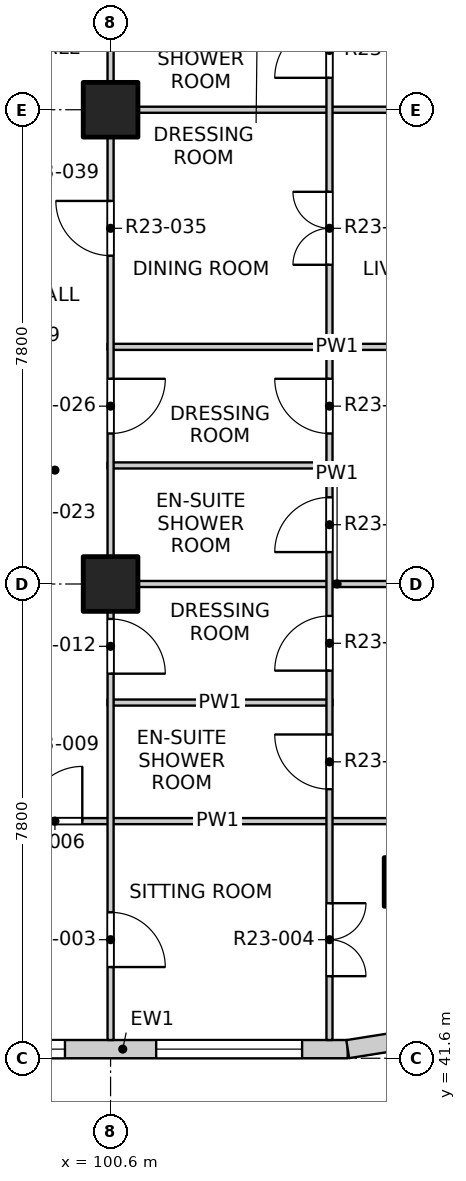
"""IFC4 building model, lengths in metres.
Left out: names, types, materials, properties, quantities, classifications, styles, units other than length and angle.
Written with IfcOpenShell. Run it as: python <this file> out.ifc"""

import sys

from ifc_helpers import new_model, si_unit, direction, frame, frame_2d, origin, origin_2d, place, context, subcontext, project, spatial, rectangle, extrude, element, fill, save


model = new_model("IFC4")
c1 = context("Model", 3, precision=1e-05, world=origin(), true_north=direction((0.0, 1.0)))
c2 = subcontext(c1, "Body", "Model", "MODEL_VIEW")
j1 = project(units=[si_unit("LENGTHUNIT", "METRE"), si_unit("PLANEANGLEUNIT", "RADIAN")], contexts=[c1])
p1 = place(None, origin())
s1 = spatial("IfcSite", under=j1, at=p1, CompositionType="ELEMENT")
p2 = place(p1, origin())
s2 = spatial("IfcBuilding", under=s1, at=p2, CompositionType="ELEMENT")
p3 = place(p2, frame((0.0, 0.0, 234.7)))
s3 = spatial("IfcBuildingStorey", under=s2, at=p3, CompositionType="ELEMENT", Elevation=234.7)
p4 = place(p3, frame((105.5, 44.5, -0.25), z_axis=(0.0, 0.0, 1.0), x_axis=(1.0, 0.0, 0.0)))
e1 = element("IfcColumn", 1, at=p4, inside=s3, PredefinedType="COLUMN", context=c2, shape_type="SweptSolid", body=[
    extrude(rectangle(XDim=0.8, YDim=0.8, at=origin_2d()), origin(), (0.0, 0.0, 1.0), 3.4),
])
for number, where, z_axis, x_axis in (
    (2, (100.6, 49.4, -0.25), (0.0, 0.0, 1.0), (1.0, 0.0, 0.0)),
    (3, (100.6, 57.2, -0.25), (0.0, 0.0, 1.0), (1.0, 0.0, 0.0)),
):
    element("IfcColumn", number, at=place(p3, frame(where, z_axis=z_axis, x_axis=x_axis)), inside=s3, PredefinedType="COLUMN", context=c2, shape_type="SweptSolid", body=[
        extrude(rectangle(XDim=0.9, YDim=0.9, at=origin_2d()), origin(), (0.0, 0.0, 1.0), 3.4),
    ])
p5 = place(p3, frame((97.1, 41.75, 0.0), z_axis=(0.0, 0.0, 1.0), x_axis=(1.0, 0.0, 0.0)))
e4 = element("IfcWall", 4, at=p5, inside=s3, PredefinedType="SOLIDWALL", context=c2, shape_type="SweptSolid", body=[
    extrude(rectangle(XDim=7.4, YDim=0.3, at=frame_2d((3.7, 0.0))), origin(), (0.0, 0.0, 1.0), 2.7),
])
p6 = place(p5, frame((0.35, 0.0, 0.9)))
e5 = element("IfcOpeningElement", 5, at=p6, cuts=e4, PredefinedType="OPENING", context=c2, shape_type="SweptSolid", body=[
    extrude(rectangle(XDim=2.4, YDim=1.8, at=frame_2d((1.2, 0.9))), frame((0.0, 0.16, 0.0), z_axis=(0.0, -1.0, 0.0), x_axis=(1.0, 0.0, 0.0)), (0.0, 0.0, 1.0), 0.32),
])
p7 = place(p5, frame((4.25, 0.0, 0.9)))
e6 = element("IfcOpeningElement", 6, at=p7, cuts=e4, PredefinedType="OPENING", context=c2, shape_type="SweptSolid", body=[
    extrude(rectangle(XDim=2.4, YDim=1.8, at=frame_2d((1.2, 0.9))), frame((0.0, 0.16, 0.0), z_axis=(0.0, -1.0, 0.0), x_axis=(1.0, 0.0, 0.0)), (0.0, 0.0, 1.0), 0.32),
])
p8 = place(p3, frame((104.5, 41.75, 0.0), z_axis=(0.0, 0.0, 1.0), x_axis=(0.987678452879, 0.156496880861, 0.0)))
e7 = element("IfcWall", 7, at=p8, inside=s3, PredefinedType="SOLIDWALL", context=c2, shape_type="SweptSolid", body=[
    extrude(rectangle(XDim=1.173, YDim=0.3, at=frame_2d((0.586, 0.0))), origin(), (0.0, 0.0, 1.0), 2.7),
])
p9 = place(p3, frame((96.625, 45.5, 0.0), z_axis=(0.0, 0.0, 1.0), x_axis=(1.0, 0.0, 0.0)))
e8 = element("IfcWall", 8, at=p9, inside=s3, PredefinedType="PARTITIONING", context=c2, shape_type="SweptSolid", body=[
    extrude(rectangle(XDim=11.475, YDim=0.1, at=frame_2d((5.738, 0.0))), origin(), (0.0, 0.0, 1.0), 3.15),
])
p10 = place(p9, frame((2.61, 0.0, 0.0)))
e9 = element("IfcOpeningElement", 9, at=p10, cuts=e8, PredefinedType="OPENING", context=c2, shape_type="SweptSolid", body=[
    extrude(rectangle(XDim=0.9, YDim=2.1, at=frame_2d((0.45, 1.05))), frame((0.0, 0.06, 0.0), z_axis=(0.0, -1.0, 0.0), x_axis=(1.0, 0.0, 0.0)), (0.0, 0.0, 1.0), 0.12),
])
p11 = place(p3, frame((100.55, 47.45, 0.0), z_axis=(0.0, 0.0, 1.0), x_axis=(1.0, 0.0, 0.0)))
e10 = element("IfcWall", 10, at=p11, inside=s3, PredefinedType="PARTITIONING", context=c2, shape_type="SweptSolid", body=[
    extrude(rectangle(XDim=3.7, YDim=0.1, at=frame_2d((1.85, 0.0))), origin(), (0.0, 0.0, 1.0), 3.15),
])
p12 = place(p3, frame((100.55, 49.4, 0.0), z_axis=(0.0, 0.0, 1.0), x_axis=(1.0, 0.0, 0.0)))
e11 = element("IfcWall", 11, at=p12, inside=s3, PredefinedType="PARTITIONING", context=c2, shape_type="SweptSolid", body=[
    extrude(rectangle(XDim=7.55, YDim=0.1, at=frame_2d((3.775, 0.0))), origin(), (0.0, 0.0, 1.0), 3.15),
])
p13 = place(p3, frame((100.55, 51.35, 0.0), z_axis=(0.0, 0.0, 1.0), x_axis=(1.0, 0.0, 0.0)))
e12 = element("IfcWall", 12, at=p13, inside=s3, PredefinedType="PARTITIONING", context=c2, shape_type="SweptSolid", body=[
    extrude(rectangle(XDim=3.7, YDim=0.1, at=frame_2d((1.85, 0.0))), origin(), (0.0, 0.0, 1.0), 3.15),
])
for number, where, z_axis, x_axis in (
    (13, (100.55, 53.3, 0.0), (0.0, 0.0, 1.0), (1.0, 0.0, 0.0)),
    (14, (100.55, 57.2, 0.0), (0.0, 0.0, 1.0), (1.0, 0.0, 0.0)),
):
    element("IfcWall", number, at=place(p3, frame(where, z_axis=z_axis, x_axis=x_axis)), inside=s3, PredefinedType="PARTITIONING", context=c2, shape_type="SweptSolid", body=[
        extrude(rectangle(XDim=7.55, YDim=0.1, at=frame_2d((3.775, 0.0))), origin(), (0.0, 0.0, 1.0), 3.15),
    ])
p14 = place(p3, frame((100.6, 41.9, 0.0), z_axis=(0.0, 0.0, 1.0), x_axis=(0.0, 1.0, 0.0)))
e15 = element("IfcWall", 15, at=p14, inside=s3, PredefinedType="PARTITIONING", context=c2, shape_type="SweptSolid", body=[
    extrude(rectangle(XDim=46.2, YDim=0.1, at=frame_2d((23.1, 0.0))), origin(), (0.0, 0.0, 1.0), 3.15),
])
p15 = place(p14, frame((1.2, 0.0, 0.0)))
e16 = element("IfcOpeningElement", 16, at=p15, cuts=e15, PredefinedType="OPENING", context=c2, shape_type="SweptSolid", body=[
    extrude(rectangle(XDim=0.9, YDim=2.1, at=frame_2d((0.45, 1.05))), frame((0.0, 0.06, 0.0), z_axis=(0.0, -1.0, 0.0), x_axis=(1.0, 0.0, 0.0)), (0.0, 0.0, 1.0), 0.12),
])
p16 = place(p14, frame((6.025, 0.0, 0.0)))
e17 = element("IfcOpeningElement", 17, at=p16, cuts=e15, PredefinedType="OPENING", context=c2, shape_type="SweptSolid", body=[
    extrude(rectangle(XDim=0.9, YDim=2.1, at=frame_2d((0.45, 1.05))), frame((0.0, 0.06, 0.0), z_axis=(0.0, -1.0, 0.0), x_axis=(1.0, 0.0, 0.0)), (0.0, 0.0, 1.0), 0.12),
])
p17 = place(p14, frame((9.975, 0.0, 0.0)))
e18 = element("IfcOpeningElement", 18, at=p17, cuts=e15, PredefinedType="OPENING", context=c2, shape_type="SweptSolid", body=[
    extrude(rectangle(XDim=0.9, YDim=2.1, at=frame_2d((0.45, 1.05))), frame((0.0, 0.06, 0.0), z_axis=(0.0, -1.0, 0.0), x_axis=(1.0, 0.0, 0.0)), (0.0, 0.0, 1.0), 0.12),
])
p18 = place(p14, frame((12.9, 0.0, 0.0)))
e19 = element("IfcOpeningElement", 19, at=p18, cuts=e15, PredefinedType="OPENING", context=c2, shape_type="SweptSolid", body=[
    extrude(rectangle(XDim=0.9, YDim=2.1, at=frame_2d((0.45, 1.05))), frame((0.0, 0.06, 0.0), z_axis=(0.0, -1.0, 0.0), x_axis=(1.0, 0.0, 0.0)), (0.0, 0.0, 1.0), 0.12),
])
p19 = place(p14, frame((17.775, 0.0, 0.0)))
e20 = element("IfcOpeningElement", 20, at=p19, cuts=e15, PredefinedType="OPENING", context=c2, shape_type="SweptSolid", body=[
    extrude(rectangle(XDim=0.9, YDim=2.1, at=frame_2d((0.45, 1.05))), frame((0.0, 0.06, 0.0), z_axis=(0.0, -1.0, 0.0), x_axis=(1.0, 0.0, 0.0)), (0.0, 0.0, 1.0), 0.12),
])
p20 = place(p14, frame((21.625, 0.0, 0.0)))
e21 = element("IfcOpeningElement", 21, at=p20, cuts=e15, PredefinedType="OPENING", context=c2, shape_type="SweptSolid", body=[
    extrude(rectangle(XDim=0.9, YDim=2.1, at=frame_2d((0.45, 1.05))), frame((0.0, 0.06, 0.0), z_axis=(0.0, -1.0, 0.0), x_axis=(1.0, 0.0, 0.0)), (0.0, 0.0, 1.0), 0.12),
])
p21 = place(p14, frame((25.575, 0.0, 0.0)))
e22 = element("IfcOpeningElement", 22, at=p21, cuts=e15, PredefinedType="OPENING", context=c2, shape_type="SweptSolid", body=[
    extrude(rectangle(XDim=0.9, YDim=2.1, at=frame_2d((0.45, 1.05))), frame((0.0, 0.06, 0.0), z_axis=(0.0, -1.0, 0.0), x_axis=(1.0, 0.0, 0.0)), (0.0, 0.0, 1.0), 0.12),
])
p22 = place(p14, frame((28.5, 0.0, 0.0)))
e23 = element("IfcOpeningElement", 23, at=p22, cuts=e15, PredefinedType="OPENING", context=c2, shape_type="SweptSolid", body=[
    extrude(rectangle(XDim=0.9, YDim=2.1, at=frame_2d((0.45, 1.05))), frame((0.0, 0.06, 0.0), z_axis=(0.0, -1.0, 0.0), x_axis=(1.0, 0.0, 0.0)), (0.0, 0.0, 1.0), 0.12),
])
p23 = place(p14, frame((33.375, 0.0, 0.0)))
e24 = element("IfcOpeningElement", 24, at=p23, cuts=e15, PredefinedType="OPENING", context=c2, shape_type="SweptSolid", body=[
    extrude(rectangle(XDim=0.9, YDim=2.1, at=frame_2d((0.45, 1.05))), frame((0.0, 0.06, 0.0), z_axis=(0.0, -1.0, 0.0), x_axis=(1.0, 0.0, 0.0)), (0.0, 0.0, 1.0), 0.12),
])
p24 = place(p14, frame((36.3, 0.0, 0.0)))
e25 = element("IfcOpeningElement", 25, at=p24, cuts=e15, PredefinedType="OPENING", context=c2, shape_type="SweptSolid", body=[
    extrude(rectangle(XDim=0.9, YDim=2.1, at=frame_2d((0.45, 1.05))), frame((0.0, 0.06, 0.0), z_axis=(0.0, -1.0, 0.0), x_axis=(1.0, 0.0, 0.0)), (0.0, 0.0, 1.0), 0.12),
])
p25 = place(p14, frame((40.2, 0.0, 0.0)))
e26 = element("IfcOpeningElement", 26, at=p25, cuts=e15, PredefinedType="OPENING", context=c2, shape_type="SweptSolid", body=[
    extrude(rectangle(XDim=0.9, YDim=2.1, at=frame_2d((0.45, 1.05))), frame((0.0, 0.06, 0.0), z_axis=(0.0, -1.0, 0.0), x_axis=(1.0, 0.0, 0.0)), (0.0, 0.0, 1.0), 0.12),
])
p26 = place(p14, frame((44.1, 0.0, 0.0)))
e27 = element("IfcOpeningElement", 27, at=p26, cuts=e15, PredefinedType="OPENING", context=c2, shape_type="SweptSolid", body=[
    extrude(rectangle(XDim=0.9, YDim=2.1, at=frame_2d((0.45, 1.05))), frame((0.0, 0.06, 0.0), z_axis=(0.0, -1.0, 0.0), x_axis=(1.0, 0.0, 0.0)), (0.0, 0.0, 1.0), 0.12),
])
p27 = place(p3, frame((104.2, 41.9, 0.0), z_axis=(0.0, 0.0, 1.0), x_axis=(0.0, 1.0, 0.0)))
e28 = element("IfcWall", 28, at=p27, inside=s3, PredefinedType="PARTITIONING", context=c2, shape_type="SweptSolid", body=[
    extrude(rectangle(XDim=19.1, YDim=0.1, at=frame_2d((9.55, 0.0))), origin(), (0.0, 0.0, 1.0), 3.15),
])
p28 = place(p27, frame((1.05, 0.0, 0.0)))
e29 = element("IfcOpeningElement", 29, at=p28, cuts=e28, PredefinedType="OPENING", context=c2, shape_type="SweptSolid", body=[
    extrude(rectangle(XDim=1.2, YDim=2.1, at=frame_2d((0.6, 1.05))), frame((0.0, 0.06, 0.0), z_axis=(0.0, -1.0, 0.0), x_axis=(1.0, 0.0, 0.0)), (0.0, 0.0, 1.0), 0.12),
])
p29 = place(p27, frame((4.125, 0.0, 0.0)))
e30 = element("IfcOpeningElement", 30, at=p29, cuts=e28, PredefinedType="OPENING", context=c2, shape_type="SweptSolid", body=[
    extrude(rectangle(XDim=0.9, YDim=2.1, at=frame_2d((0.45, 1.05))), frame((0.0, 0.06, 0.0), z_axis=(0.0, -1.0, 0.0), x_axis=(1.0, 0.0, 0.0)), (0.0, 0.0, 1.0), 0.12),
])
p30 = place(p27, frame((6.075, 0.0, 0.0)))
e31 = element("IfcOpeningElement", 31, at=p30, cuts=e28, PredefinedType="OPENING", context=c2, shape_type="SweptSolid", body=[
    extrude(rectangle(XDim=0.9, YDim=2.1, at=frame_2d((0.45, 1.05))), frame((0.0, 0.06, 0.0), z_axis=(0.0, -1.0, 0.0), x_axis=(1.0, 0.0, 0.0)), (0.0, 0.0, 1.0), 0.12),
])
p31 = place(p27, frame((8.025, 0.0, 0.0)))
e32 = element("IfcOpeningElement", 32, at=p31, cuts=e28, PredefinedType="OPENING", context=c2, shape_type="SweptSolid", body=[
    extrude(rectangle(XDim=0.9, YDim=2.1, at=frame_2d((0.45, 1.05))), frame((0.0, 0.06, 0.0), z_axis=(0.0, -1.0, 0.0), x_axis=(1.0, 0.0, 0.0)), (0.0, 0.0, 1.0), 0.12),
])
p32 = place(p27, frame((9.975, 0.0, 0.0)))
e33 = element("IfcOpeningElement", 33, at=p32, cuts=e28, PredefinedType="OPENING", context=c2, shape_type="SweptSolid", body=[
    extrude(rectangle(XDim=0.9, YDim=2.1, at=frame_2d((0.45, 1.05))), frame((0.0, 0.06, 0.0), z_axis=(0.0, -1.0, 0.0), x_axis=(1.0, 0.0, 0.0)), (0.0, 0.0, 1.0), 0.12),
])
p33 = place(p27, frame((12.75, 0.0, 0.0)))
e34 = element("IfcOpeningElement", 34, at=p33, cuts=e28, PredefinedType="OPENING", context=c2, shape_type="SweptSolid", body=[
    extrude(rectangle(XDim=1.2, YDim=2.1, at=frame_2d((0.6, 1.05))), frame((0.0, 0.06, 0.0), z_axis=(0.0, -1.0, 0.0), x_axis=(1.0, 0.0, 0.0)), (0.0, 0.0, 1.0), 0.12),
])
p34 = place(p27, frame((15.825, 0.0, 0.0)))
e35 = element("IfcOpeningElement", 35, at=p34, cuts=e28, PredefinedType="OPENING", context=c2, shape_type="SweptSolid", body=[
    extrude(rectangle(XDim=0.9, YDim=2.1, at=frame_2d((0.45, 1.05))), frame((0.0, 0.06, 0.0), z_axis=(0.0, -1.0, 0.0), x_axis=(1.0, 0.0, 0.0)), (0.0, 0.0, 1.0), 0.12),
])
p35 = place(p27, frame((17.775, 0.0, 0.0)))
e36 = element("IfcOpeningElement", 36, at=p35, cuts=e28, PredefinedType="OPENING", context=c2, shape_type="SweptSolid", body=[
    extrude(rectangle(XDim=0.9, YDim=2.1, at=frame_2d((0.45, 1.05))), frame((0.0, 0.06, 0.0), z_axis=(0.0, -1.0, 0.0), x_axis=(1.0, 0.0, 0.0)), (0.0, 0.0, 1.0), 0.12),
])
p36 = place(p6, origin())
e37 = element("IfcWindow", 37, at=p36, inside=s3, PartitioningType="DOUBLE_PANEL_VERTICAL", PredefinedType="WINDOW", context=c2, shape_type="SweptSolid", body=[
    extrude(rectangle(XDim=2.4, YDim=1.8, at=frame_2d((1.2, 0.9))), frame((0.0, 0.03, 0.0), z_axis=(0.0, -1.0, 0.0), x_axis=(1.0, 0.0, 0.0)), (0.0, 0.0, 1.0), 0.06),
])
fill(e5, e37)
p37 = place(p7, origin())
e38 = element("IfcWindow", 38, at=p37, inside=s3, PartitioningType="DOUBLE_PANEL_VERTICAL", PredefinedType="WINDOW", context=c2, shape_type="SweptSolid", body=[
    extrude(rectangle(XDim=2.4, YDim=1.8, at=frame_2d((1.2, 0.9))), frame((0.0, 0.03, 0.0), z_axis=(0.0, -1.0, 0.0), x_axis=(1.0, 0.0, 0.0)), (0.0, 0.0, 1.0), 0.06),
])
fill(e6, e38)
p38 = place(p15, origin())
e39 = element("IfcDoor", 39, at=p38, inside=s3, OperationType="SINGLE_SWING_RIGHT", PredefinedType="DOOR", context=c2, shape_type="SweptSolid", body=[
    extrude(rectangle(XDim=0.9, YDim=2.1, at=frame_2d((0.45, 1.05))), frame((0.0, 0.025, 0.0), z_axis=(0.0, -1.0, 0.0), x_axis=(1.0, 0.0, 0.0)), (0.0, 0.0, 1.0), 0.05),
])
fill(e16, e39)
p39 = place(p28, origin())
e40 = element("IfcDoor", 40, at=p39, inside=s3, OperationType="DOUBLE_DOOR_SINGLE_SWING", PredefinedType="DOOR", context=c2, shape_type="SweptSolid", body=[
    extrude(rectangle(XDim=1.2, YDim=2.1, at=frame_2d((0.6, 1.05))), frame((0.0, 0.025, 0.0), z_axis=(0.0, -1.0, 0.0), x_axis=(1.0, 0.0, 0.0)), (0.0, 0.0, 1.0), 0.05),
])
fill(e29, e40)
p40 = place(p10, origin())
e41 = element("IfcDoor", 41, at=p40, inside=s3, OperationType="SINGLE_SWING_RIGHT", PredefinedType="DOOR", context=c2, shape_type="SweptSolid", body=[
    extrude(rectangle(XDim=0.9, YDim=2.1, at=frame_2d((0.45, 1.05))), frame((0.0, 0.025, 0.0), z_axis=(0.0, -1.0, 0.0), x_axis=(1.0, 0.0, 0.0)), (0.0, 0.0, 1.0), 0.05),
])
fill(e9, e41)
p41 = place(p29, origin())
e42 = element("IfcDoor", 42, at=p41, inside=s3, OperationType="SINGLE_SWING_RIGHT", PredefinedType="DOOR", context=c2, shape_type="SweptSolid", body=[
    extrude(rectangle(XDim=0.9, YDim=2.1, at=frame_2d((0.45, 1.05))), frame((0.0, 0.025, 0.0), z_axis=(0.0, -1.0, 0.0), x_axis=(1.0, 0.0, 0.0)), (0.0, 0.0, 1.0), 0.05),
])
fill(e30, e42)
p42 = place(p16, origin())
e43 = element("IfcDoor", 43, at=p42, inside=s3, OperationType="SINGLE_SWING_RIGHT", PredefinedType="DOOR", context=c2, shape_type="SweptSolid", body=[
    extrude(rectangle(XDim=0.9, YDim=2.1, at=frame_2d((0.45, 1.05))), frame((0.0, 0.025, 0.0), z_axis=(0.0, -1.0, 0.0), x_axis=(1.0, 0.0, 0.0)), (0.0, 0.0, 1.0), 0.05),
])
fill(e17, e43)
p43 = place(p30, origin())
e44 = element("IfcDoor", 44, at=p43, inside=s3, OperationType="SINGLE_SWING_LEFT", PredefinedType="DOOR", context=c2, shape_type="SweptSolid", body=[
    extrude(rectangle(XDim=0.9, YDim=2.1, at=frame_2d((0.45, 1.05))), frame((0.0, 0.025, 0.0), z_axis=(0.0, -1.0, 0.0), x_axis=(1.0, 0.0, 0.0)), (0.0, 0.0, 1.0), 0.05),
])
fill(e31, e44)
p44 = place(p31, origin())
e45 = element("IfcDoor", 45, at=p44, inside=s3, OperationType="SINGLE_SWING_LEFT", PredefinedType="DOOR", context=c2, shape_type="SweptSolid", body=[
    extrude(rectangle(XDim=0.9, YDim=2.1, at=frame_2d((0.45, 1.05))), frame((0.0, 0.025, 0.0), z_axis=(0.0, -1.0, 0.0), x_axis=(1.0, 0.0, 0.0)), (0.0, 0.0, 1.0), 0.05),
])
fill(e32, e45)
p45 = place(p17, origin())
e46 = element("IfcDoor", 46, at=p45, inside=s3, OperationType="SINGLE_SWING_LEFT", PredefinedType="DOOR", context=c2, shape_type="SweptSolid", body=[
    extrude(rectangle(XDim=0.9, YDim=2.1, at=frame_2d((0.45, 1.05))), frame((0.0, 0.025, 0.0), z_axis=(0.0, -1.0, 0.0), x_axis=(1.0, 0.0, 0.0)), (0.0, 0.0, 1.0), 0.05),
])
fill(e18, e46)
p46 = place(p32, origin())
e47 = element("IfcDoor", 47, at=p46, inside=s3, OperationType="SINGLE_SWING_RIGHT", PredefinedType="DOOR", context=c2, shape_type="SweptSolid", body=[
    extrude(rectangle(XDim=0.9, YDim=2.1, at=frame_2d((0.45, 1.05))), frame((0.0, 0.025, 0.0), z_axis=(0.0, -1.0, 0.0), x_axis=(1.0, 0.0, 0.0)), (0.0, 0.0, 1.0), 0.05),
])
fill(e33, e47)
p47 = place(p18, origin())
e48 = element("IfcDoor", 48, at=p47, inside=s3, OperationType="SINGLE_SWING_RIGHT", PredefinedType="DOOR", context=c2, shape_type="SweptSolid", body=[
    extrude(rectangle(XDim=0.9, YDim=2.1, at=frame_2d((0.45, 1.05))), frame((0.0, 0.025, 0.0), z_axis=(0.0, -1.0, 0.0), x_axis=(1.0, 0.0, 0.0)), (0.0, 0.0, 1.0), 0.05),
])
fill(e19, e48)
p48 = place(p33, origin())
e49 = element("IfcDoor", 49, at=p48, inside=s3, OperationType="DOUBLE_DOOR_SINGLE_SWING", PredefinedType="DOOR", context=c2, shape_type="SweptSolid", body=[
    extrude(rectangle(XDim=1.2, YDim=2.1, at=frame_2d((0.6, 1.05))), frame((0.0, 0.025, 0.0), z_axis=(0.0, -1.0, 0.0), x_axis=(1.0, 0.0, 0.0)), (0.0, 0.0, 1.0), 0.05),
])
fill(e34, e49)
p49 = place(p34, origin())
e50 = element("IfcDoor", 50, at=p49, inside=s3, OperationType="SINGLE_SWING_LEFT", PredefinedType="DOOR", context=c2, shape_type="SweptSolid", body=[
    extrude(rectangle(XDim=0.9, YDim=2.1, at=frame_2d((0.45, 1.05))), frame((0.0, 0.025, 0.0), z_axis=(0.0, -1.0, 0.0), x_axis=(1.0, 0.0, 0.0)), (0.0, 0.0, 1.0), 0.05),
])
fill(e35, e50)
save(model, sys.argv[1])
